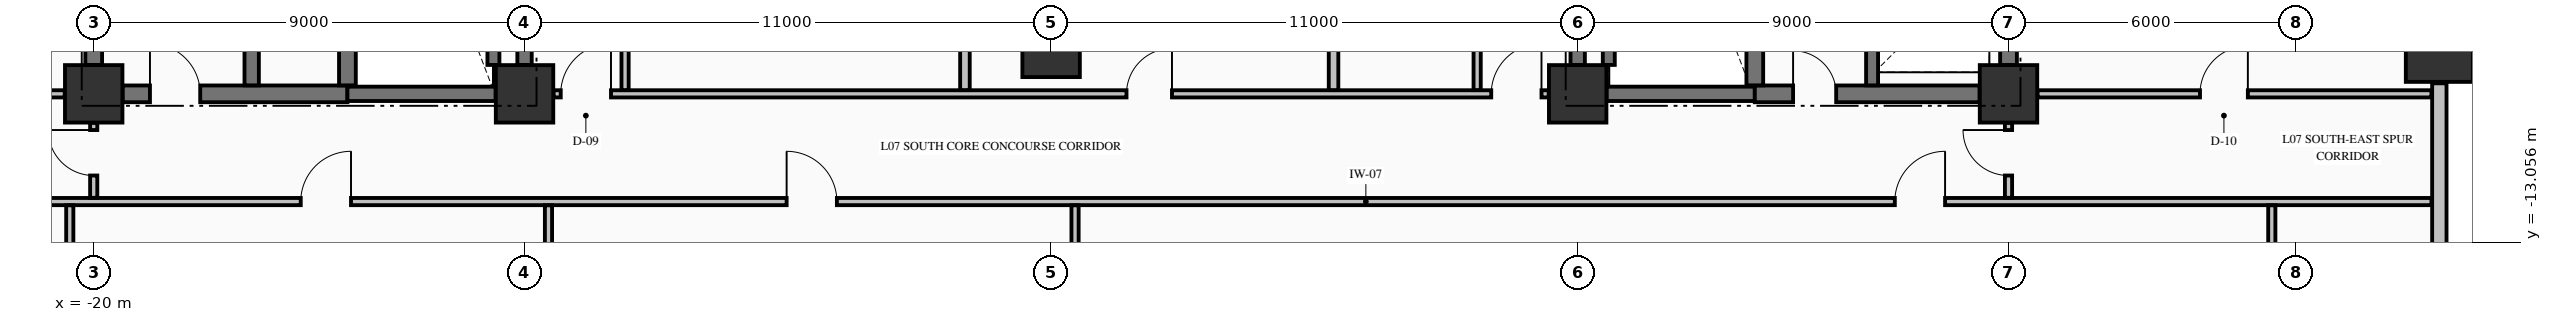
"""IFC4 building model, lengths in metres.
Left out: names, types, materials, properties, quantities, classifications, styles, units other than length and angle.
Written with IfcOpenShell. Run it as: python <this file> out.ifc"""

import sys

from ifc_helpers import new_model, si_unit, direction, frame, frame_2d, origin, origin_2d, place, context, subcontext, project, spatial, rectangle, extrude, element, fill, save


model = new_model("IFC4")
c1 = context("Model", 3, precision=1e-05, world=origin(), true_north=direction((0.0, 1.0)))
c2 = subcontext(c1, "Body", "Model", "MODEL_VIEW")
j1 = project(units=[si_unit("LENGTHUNIT", "METRE"), si_unit("PLANEANGLEUNIT", "RADIAN")], contexts=[c1])
p1 = place(None, origin())
s1 = spatial("IfcSite", under=j1, at=p1, CompositionType="ELEMENT")
p2 = place(p1, origin())
s2 = spatial("IfcBuilding", under=s1, at=p2, CompositionType="ELEMENT")
p3 = place(p2, frame((0.0, 0.0, 34.34)))
s3 = spatial("IfcBuildingStorey", under=s2, at=p3, CompositionType="ELEMENT", Elevation=34.34)
p4 = place(p3, frame((29.0, -9.0, -0.3), z_axis=(0.0, 0.0, 1.0), x_axis=(1.0, 0.0, 0.0)))
e1 = element("IfcColumn", 1, at=p4, inside=s3, PredefinedType="COLUMN", context=c2, shape_type="SweptSolid", body=[
    extrude(rectangle(XDim=1.4, YDim=1.4, at=origin_2d()), origin(), (0.0, 0.0, 1.0), 3.62),
])
for number, where, z_axis, x_axis in (
    (2, (-20.0, -9.95, -0.3), (0.0, 0.0, 1.0), (1.0, 0.0, 0.0)),
    (3, (-11.0, -9.95, -0.3), (0.0, 0.0, 1.0), (1.0, 0.0, 0.0)),
    (4, (11.0, -9.95, -0.3), (0.0, 0.0, 1.0), (1.0, 0.0, 0.0)),
    (5, (20.0, -9.95, -0.3), (0.0, 0.0, 1.0), (1.0, 0.0, 0.0)),
    (6, (0.0, -9.0, -0.3), (0.0, 0.0, 1.0), (1.0, 0.0, 0.0)),
):
    element("IfcColumn", number, at=place(p3, frame(where, z_axis=z_axis, x_axis=x_axis)), inside=s3, PredefinedType="COLUMN", context=c2, shape_type="SweptSolid", body=[
        extrude(rectangle(XDim=1.2, YDim=1.2, at=origin_2d()), origin(), (0.0, 0.0, 1.0), 3.62),
    ])
p5 = place(p3, frame((29.0, -22.27, 0.0), z_axis=(0.0, 0.0, 1.0), x_axis=(0.0, 1.0, 0.0)))
e7 = element("IfcWall", 7, at=p5, inside=s3, PredefinedType="STANDARD", context=c2, shape_type="SweptSolid", body=[
    extrude(rectangle(XDim=12.54, YDim=0.3, at=frame_2d((6.27, 0.0))), origin(), (0.0, 0.0, 1.0), 2.712),
])
p6 = place(p3, frame((-19.396, -9.95, 0.0), z_axis=(0.0, 0.0, 1.0), x_axis=(1.0, 0.0, 0.0)))
e8 = element("IfcWall", 8, at=p6, inside=s3, PredefinedType="SHEAR", context=c2, shape_type="SweptSolid", body=[
    extrude(rectangle(XDim=4.696, YDim=0.35, at=frame_2d((2.348, 0.0))), origin(), (0.0, 0.0, 1.0), 3.32),
])
p7 = place(p6, frame((0.571, 0.0, 0.0)))
e9 = element("IfcOpeningElement", 9, at=p7, cuts=e8, PredefinedType="OPENING", context=c2, shape_type="SweptSolid", body=[
    extrude(rectangle(XDim=1.05, YDim=2.15, at=frame_2d((0.525, 1.075))), frame((0.0, 0.185, 0.0), z_axis=(0.0, -1.0, 0.0), x_axis=(1.0, 0.0, 0.0)), (0.0, 0.0, 1.0), 0.37),
])
for number, where, z_axis, x_axis in (
    (10, (-14.7, -9.95, 0.0), (0.0, 0.0, 1.0), (1.0, 0.0, 0.0)),
    (11, (11.604, -9.95, 0.0), (0.0, 0.0, 1.0), (1.0, 0.0, 0.0)),
):
    element("IfcWall", number, at=place(p3, frame(where, z_axis=z_axis, x_axis=x_axis)), inside=s3, PredefinedType="SHEAR", context=c2, shape_type="SweptSolid", body=[
        extrude(rectangle(XDim=3.096, YDim=0.3, at=frame_2d((1.548, 0.0))), origin(), (0.0, 0.0, 1.0), 3.32),
    ])
p8 = place(p3, frame((14.7, -9.95, 0.0), z_axis=(0.0, 0.0, 1.0), x_axis=(1.0, 0.0, 0.0)))
e12 = element("IfcWall", 12, at=p8, inside=s3, PredefinedType="SHEAR", context=c2, shape_type="SweptSolid", body=[
    extrude(rectangle(XDim=4.696, YDim=0.35, at=frame_2d((2.348, 0.0))), origin(), (0.0, 0.0, 1.0), 3.32),
])
p9 = place(p8, frame((0.8, 0.0, 0.0)))
e13 = element("IfcOpeningElement", 13, at=p9, cuts=e12, PredefinedType="OPENING", context=c2, shape_type="SweptSolid", body=[
    extrude(rectangle(XDim=0.9, YDim=2.15, at=frame_2d((0.45, 1.075))), frame((0.0, 0.185, 0.0), z_axis=(0.0, -1.0, 0.0), x_axis=(1.0, 0.0, 0.0)), (0.0, 0.0, 1.0), 0.37),
])
p10 = place(p3, frame((-23.835, -12.2, 0.0), z_axis=(0.0, 0.0, 1.0), x_axis=(1.0, 0.0, 0.0)))
e14 = element("IfcWall", 14, at=p10, inside=s3, PredefinedType="PARTITIONING", context=c2, shape_type="SweptSolid", body=[
    extrude(rectangle(XDim=52.67, YDim=0.15, at=frame_2d((26.335, 0.0))), origin(), (0.0, 0.0, 1.0), 3.32),
])
p11 = place(p10, frame((8.16, 0.0, 0.0)))
e15 = element("IfcOpeningElement", 15, at=p11, cuts=e14, PredefinedType="OPENING", context=c2, shape_type="SweptSolid", body=[
    extrude(rectangle(XDim=1.05, YDim=2.15, at=frame_2d((0.525, 1.075))), frame((0.0, 0.085, 0.0), z_axis=(0.0, -1.0, 0.0), x_axis=(1.0, 0.0, 0.0)), (0.0, 0.0, 1.0), 0.17),
])
p12 = place(p10, frame((18.31, 0.0, 0.0)))
e16 = element("IfcOpeningElement", 16, at=p12, cuts=e14, PredefinedType="OPENING", context=c2, shape_type="SweptSolid", body=[
    extrude(rectangle(XDim=1.05, YDim=2.15, at=frame_2d((0.525, 1.075))), frame((0.0, 0.085, 0.0), z_axis=(0.0, -1.0, 0.0), x_axis=(1.0, 0.0, 0.0)), (0.0, 0.0, 1.0), 0.17),
])
p13 = place(p10, frame((41.46, 0.0, 0.0)))
e17 = element("IfcOpeningElement", 17, at=p13, cuts=e14, PredefinedType="OPENING", context=c2, shape_type="SweptSolid", body=[
    extrude(rectangle(XDim=1.05, YDim=2.15, at=frame_2d((0.525, 1.075))), frame((0.0, 0.085, 0.0), z_axis=(0.0, -1.0, 0.0), x_axis=(1.0, 0.0, 0.0)), (0.0, 0.0, 1.0), 0.17),
])
p14 = place(p3, frame((-23.835, -9.95, 0.0), z_axis=(0.0, 0.0, 1.0), x_axis=(1.0, 0.0, 0.0)))
e18 = element("IfcWall", 18, at=p14, inside=s3, PredefinedType="PARTITIONING", context=c2, shape_type="SweptSolid", body=[
    extrude(rectangle(XDim=3.229, YDim=0.15, at=frame_2d((1.615, 0.0))), origin(), (0.0, 0.0, 1.0), 3.32),
])
p15 = place(p14, frame((1.36, 0.0, 0.0)))
e19 = element("IfcOpeningElement", 19, at=p15, cuts=e18, PredefinedType="OPENING", context=c2, shape_type="SweptSolid", body=[
    extrude(rectangle(XDim=0.95, YDim=2.15, at=frame_2d((0.475, 1.075))), frame((0.0, 0.085, 0.0), z_axis=(0.0, -1.0, 0.0), x_axis=(1.0, 0.0, 0.0)), (0.0, 0.0, 1.0), 0.17),
])
p16 = place(p3, frame((-10.394, -9.95, 0.0), z_axis=(0.0, 0.0, 1.0), x_axis=(1.0, 0.0, 0.0)))
e20 = element("IfcWall", 20, at=p16, inside=s3, PredefinedType="PARTITIONING", context=c2, shape_type="SweptSolid", body=[
    extrude(rectangle(XDim=20.788, YDim=0.15, at=frame_2d((10.394, 0.0))), origin(), (0.0, 0.0, 1.0), 3.32),
])
p17 = place(p16, frame((0.15, 0.0, 0.0)))
e21 = element("IfcOpeningElement", 21, at=p17, cuts=e20, PredefinedType="OPENING", context=c2, shape_type="SweptSolid", body=[
    extrude(rectangle(XDim=1.05, YDim=2.15, at=frame_2d((0.525, 1.075))), frame((0.0, 0.085, 0.0), z_axis=(0.0, -1.0, 0.0), x_axis=(1.0, 0.0, 0.0)), (0.0, 0.0, 1.0), 0.17),
])
p18 = place(p16, frame((19.588, 0.0, 0.0)))
e22 = element("IfcOpeningElement", 22, at=p18, cuts=e20, PredefinedType="OPENING", context=c2, shape_type="SweptSolid", body=[
    extrude(rectangle(XDim=1.05, YDim=2.15, at=frame_2d((0.525, 1.075))), frame((0.0, 0.085, 0.0), z_axis=(0.0, -1.0, 0.0), x_axis=(1.0, 0.0, 0.0)), (0.0, 0.0, 1.0), 0.17),
])
p19 = place(p16, frame((11.969, 0.0, 0.0)))
e23 = element("IfcOpeningElement", 23, at=p19, cuts=e20, PredefinedType="OPENING", context=c2, shape_type="SweptSolid", body=[
    extrude(rectangle(XDim=0.95, YDim=2.15, at=frame_2d((0.475, 1.075))), frame((0.0, 0.085, 0.0), z_axis=(0.0, -1.0, 0.0), x_axis=(1.0, 0.0, 0.0)), (0.0, 0.0, 1.0), 0.17),
])
p20 = place(p3, frame((20.606, -9.95, 0.0), z_axis=(0.0, 0.0, 1.0), x_axis=(1.0, 0.0, 0.0)))
e24 = element("IfcWall", 24, at=p20, inside=s3, PredefinedType="PARTITIONING", context=c2, shape_type="SweptSolid", body=[
    extrude(rectangle(XDim=8.229, YDim=0.15, at=frame_2d((4.115, 0.0))), origin(), (0.0, 0.0, 1.0), 3.32),
])
p21 = place(p20, frame((3.394, 0.0, 0.0)))
e25 = element("IfcOpeningElement", 25, at=p21, cuts=e24, PredefinedType="OPENING", context=c2, shape_type="SweptSolid", body=[
    extrude(rectangle(XDim=1.0, YDim=2.15, at=frame_2d((0.5, 1.075))), frame((0.0, 0.085, 0.0), z_axis=(0.0, -1.0, 0.0), x_axis=(1.0, 0.0, 0.0)), (0.0, 0.0, 1.0), 0.17),
])
p22 = place(p3, frame((-20.0, -9.346, 0.0), z_axis=(0.0, 0.0, 1.0), x_axis=(0.0, 1.0, 0.0)))
e26 = element("IfcWall", 26, at=p22, inside=s3, PredefinedType="SHEAR", context=c2, shape_type="SweptSolid", body=[
    extrude(rectangle(XDim=8.742, YDim=0.35, at=frame_2d((4.371, 0.0))), origin(), (0.0, 0.0, 1.0), 3.32),
])
p23 = place(p3, frame((-16.7, -9.773, 0.0), z_axis=(0.0, 0.0, 1.0), x_axis=(0.0, 1.0, 0.0)))
e27 = element("IfcWall", 27, at=p23, inside=s3, PredefinedType="SHEAR", context=c2, shape_type="SweptSolid", body=[
    extrude(rectangle(XDim=9.371, YDim=0.3, at=frame_2d((4.686, 0.0))), origin(), (0.0, 0.0, 1.0), 3.32),
])
p24 = place(p3, frame((-14.7, -9.773, 0.0), z_axis=(0.0, 0.0, 1.0), x_axis=(0.0, 1.0, 0.0)))
e28 = element("IfcWall", 28, at=p24, inside=s3, PredefinedType="SHEAR", context=c2, shape_type="SweptSolid", body=[
    extrude(rectangle(XDim=9.371, YDim=0.35, at=frame_2d((4.686, 0.0))), origin(), (0.0, 0.0, 1.0), 3.32),
])
p25 = place(p3, frame((-11.65, -9.346, 0.0), z_axis=(0.0, 0.0, 1.0), x_axis=(0.0, 1.0, 0.0)))
e29 = element("IfcWall", 29, at=p25, inside=s3, PredefinedType="SOLIDWALL", context=c2, shape_type="SweptSolid", body=[
    extrude(rectangle(XDim=8.742, YDim=0.25, at=frame_2d((4.371, 0.0))), origin(), (0.0, 0.0, 1.0), 3.32),
])
for number, where, z_axis, x_axis in (
    (30, (-11.0, -9.346, 0.0), (0.0, 0.0, 1.0), (0.0, 1.0, 0.0)),
    (31, (11.0, -9.346, 0.0), (0.0, 0.0, 1.0), (0.0, 1.0, 0.0)),
):
    element("IfcWall", number, at=place(p3, frame(where, z_axis=z_axis, x_axis=x_axis)), inside=s3, PredefinedType="SHEAR", context=c2, shape_type="SweptSolid", body=[
        extrude(rectangle(XDim=8.742, YDim=0.3, at=frame_2d((4.371, 0.0))), origin(), (0.0, 0.0, 1.0), 3.32),
    ])
p26 = place(p3, frame((11.65, -9.346, 0.0), z_axis=(0.0, 0.0, 1.0), x_axis=(0.0, 1.0, 0.0)))
e32 = element("IfcWall", 32, at=p26, inside=s3, PredefinedType="SOLIDWALL", context=c2, shape_type="SweptSolid", body=[
    extrude(rectangle(XDim=8.742, YDim=0.25, at=frame_2d((4.371, 0.0))), origin(), (0.0, 0.0, 1.0), 3.32),
])
p27 = place(p3, frame((14.7, -9.773, 0.0), z_axis=(0.0, 0.0, 1.0), x_axis=(0.0, 1.0, 0.0)))
e33 = element("IfcWall", 33, at=p27, inside=s3, PredefinedType="SHEAR", context=c2, shape_type="SweptSolid", body=[
    extrude(rectangle(XDim=9.371, YDim=0.35, at=frame_2d((4.686, 0.0))), origin(), (0.0, 0.0, 1.0), 3.32),
])
p28 = place(p3, frame((17.15, -9.773, 0.0), z_axis=(0.0, 0.0, 1.0), x_axis=(0.0, 1.0, 0.0)))
e34 = element("IfcWall", 34, at=p28, inside=s3, PredefinedType="SOLIDWALL", context=c2, shape_type="SweptSolid", body=[
    extrude(rectangle(XDim=2.596, YDim=0.25, at=frame_2d((1.298, 0.0))), origin(), (0.0, 0.0, 1.0), 3.32),
])
p29 = place(p3, frame((20.0, -9.346, 0.0), z_axis=(0.0, 0.0, 1.0), x_axis=(0.0, 1.0, 0.0)))
e35 = element("IfcWall", 35, at=p29, inside=s3, PredefinedType="SHEAR", context=c2, shape_type="SweptSolid", body=[
    extrude(rectangle(XDim=2.169, YDim=0.35, at=frame_2d((1.084, 0.0))), origin(), (0.0, 0.0, 1.0), 3.32),
])
p30 = place(p3, frame((-20.5, -22.294, 0.0), z_axis=(0.0, 0.0, 1.0), x_axis=(0.0, 1.0, 0.0)))
e36 = element("IfcWall", 36, at=p30, inside=s3, PredefinedType="PARTITIONING", context=c2, shape_type="SweptSolid", body=[
    extrude(rectangle(XDim=10.016, YDim=0.15, at=frame_2d((5.008, 0.0))), origin(), (0.0, 0.0, 1.0), 3.32),
])
p31 = place(p3, frame((-20.0, -12.122, 0.0), z_axis=(0.0, 0.0, 1.0), x_axis=(0.0, 1.0, 0.0)))
e37 = element("IfcWall", 37, at=p31, inside=s3, PredefinedType="PARTITIONING", context=c2, shape_type="SweptSolid", body=[
    extrude(rectangle(XDim=1.566, YDim=0.15, at=frame_2d((0.783, 0.0))), origin(), (0.0, 0.0, 1.0), 3.32),
])
p32 = place(p31, frame((0.466, 0.0, 0.0)))
e38 = element("IfcOpeningElement", 38, at=p32, cuts=e37, PredefinedType="OPENING", context=c2, shape_type="SweptSolid", body=[
    extrude(rectangle(XDim=0.95, YDim=2.15, at=frame_2d((0.475, 1.075))), frame((0.0, 0.085, 0.0), z_axis=(0.0, -1.0, 0.0), x_axis=(1.0, 0.0, 0.0)), (0.0, 0.0, 1.0), 0.17),
])
p33 = place(p3, frame((-10.5, -25.794, 0.0), z_axis=(0.0, 0.0, 1.0), x_axis=(0.0, 1.0, 0.0)))
e39 = element("IfcWall", 39, at=p33, inside=s3, PredefinedType="PARTITIONING", context=c2, shape_type="SweptSolid", body=[
    extrude(rectangle(XDim=13.516, YDim=0.15, at=frame_2d((6.758, 0.0))), origin(), (0.0, 0.0, 1.0), 3.32),
])
p34 = place(p3, frame((-8.9, -9.872, 0.0), z_axis=(0.0, 0.0, 1.0), x_axis=(0.0, 1.0, 0.0)))
e40 = element("IfcWall", 40, at=p34, inside=s3, PredefinedType="PARTITIONING", context=c2, shape_type="SweptSolid", body=[
    extrude(rectangle(XDim=6.569, YDim=0.15, at=frame_2d((3.285, 0.0))), origin(), (0.0, 0.0, 1.0), 3.32),
])
p35 = place(p34, frame((2.827, 0.0, 0.0)))
e41 = element("IfcOpeningElement", 41, at=p35, cuts=e40, PredefinedType="OPENING", context=c2, shape_type="SweptSolid", body=[
    extrude(rectangle(XDim=0.95, YDim=2.15, at=frame_2d((0.475, 1.075))), frame((0.0, 0.085, 0.0), z_axis=(0.0, -1.0, 0.0), x_axis=(1.0, 0.0, 0.0)), (0.0, 0.0, 1.0), 0.17),
])
p36 = place(p3, frame((-1.8, -9.872, 0.0), z_axis=(0.0, 0.0, 1.0), x_axis=(0.0, 1.0, 0.0)))
e42 = element("IfcWall", 42, at=p36, inside=s3, PredefinedType="PARTITIONING", context=c2, shape_type="SweptSolid", body=[
    extrude(rectangle(XDim=4.969, YDim=0.2, at=frame_2d((2.484, 0.0))), origin(), (0.0, 0.0, 1.0), 3.32),
])
p37 = place(p3, frame((0.5, -25.794, 0.0), z_axis=(0.0, 0.0, 1.0), x_axis=(0.0, 1.0, 0.0)))
e43 = element("IfcWall", 43, at=p37, inside=s3, PredefinedType="PARTITIONING", context=c2, shape_type="SweptSolid", body=[
    extrude(rectangle(XDim=13.516, YDim=0.15, at=frame_2d((6.758, 0.0))), origin(), (0.0, 0.0, 1.0), 3.32),
])
p38 = place(p3, frame((5.9, -9.872, 0.0), z_axis=(0.0, 0.0, 1.0), x_axis=(0.0, 1.0, 0.0)))
e44 = element("IfcWall", 44, at=p38, inside=s3, PredefinedType="PARTITIONING", context=c2, shape_type="SweptSolid", body=[
    extrude(rectangle(XDim=4.969, YDim=0.2, at=frame_2d((2.484, 0.0))), origin(), (0.0, 0.0, 1.0), 3.32),
])
p39 = place(p3, frame((8.9, -9.872, 0.0), z_axis=(0.0, 0.0, 1.0), x_axis=(0.0, 1.0, 0.0)))
e45 = element("IfcWall", 45, at=p39, inside=s3, PredefinedType="PARTITIONING", context=c2, shape_type="SweptSolid", body=[
    extrude(rectangle(XDim=4.969, YDim=0.15, at=frame_2d((2.484, 0.0))), origin(), (0.0, 0.0, 1.0), 3.32),
])
p40 = place(p39, frame((1.997, 0.0, 0.0)))
e46 = element("IfcOpeningElement", 46, at=p40, cuts=e45, PredefinedType="OPENING", context=c2, shape_type="SweptSolid", body=[
    extrude(rectangle(XDim=0.95, YDim=2.15, at=frame_2d((0.475, 1.075))), frame((0.0, 0.085, 0.0), z_axis=(0.0, -1.0, 0.0), x_axis=(1.0, 0.0, 0.0)), (0.0, 0.0, 1.0), 0.17),
])
p41 = place(p3, frame((20.0, -12.122, 0.0), z_axis=(0.0, 0.0, 1.0), x_axis=(0.0, 1.0, 0.0)))
e47 = element("IfcWall", 47, at=p41, inside=s3, PredefinedType="PARTITIONING", context=c2, shape_type="SweptSolid", body=[
    extrude(rectangle(XDim=1.566, YDim=0.15, at=frame_2d((0.783, 0.0))), origin(), (0.0, 0.0, 1.0), 2.66),
])
p42 = place(p41, frame((0.466, 0.0, 0.0)))
e48 = element("IfcOpeningElement", 48, at=p42, cuts=e47, PredefinedType="OPENING", context=c2, shape_type="SweptSolid", body=[
    extrude(rectangle(XDim=0.95, YDim=2.15, at=frame_2d((0.475, 1.075))), frame((0.0, 0.085, 0.0), z_axis=(0.0, -1.0, 0.0), x_axis=(1.0, 0.0, 0.0)), (0.0, 0.0, 1.0), 0.17),
])
p43 = place(p3, frame((25.5, -22.294, 0.0), z_axis=(0.0, 0.0, 1.0), x_axis=(0.0, 1.0, 0.0)))
e49 = element("IfcWall", 49, at=p43, inside=s3, PredefinedType="PARTITIONING", context=c2, shape_type="SweptSolid", body=[
    extrude(rectangle(XDim=10.016, YDim=0.15, at=frame_2d((5.008, 0.0))), origin(), (0.0, 0.0, 1.0), 3.32),
])
p44 = place(p7, origin())
e50 = element("IfcDoor", 50, at=p44, inside=s3, OperationType="SINGLE_SWING_LEFT", PredefinedType="DOOR", context=c2, shape_type="SweptSolid", body=[
    extrude(rectangle(XDim=1.05, YDim=2.15, at=frame_2d((0.525, 1.075))), frame((0.0, 0.025, 0.0), z_axis=(0.0, -1.0, 0.0), x_axis=(1.0, 0.0, 0.0)), (0.0, 0.0, 1.0), 0.05),
])
fill(e9, e50)
p45 = place(p9, origin())
e51 = element("IfcDoor", 51, at=p45, inside=s3, OperationType="SINGLE_SWING_LEFT", PredefinedType="DOOR", context=c2, shape_type="SweptSolid", body=[
    extrude(rectangle(XDim=0.9, YDim=2.15, at=frame_2d((0.45, 1.075))), frame((0.0, 0.025, 0.0), z_axis=(0.0, -1.0, 0.0), x_axis=(1.0, 0.0, 0.0)), (0.0, 0.0, 1.0), 0.05),
])
fill(e13, e51)
p46 = place(p17, origin())
e52 = element("IfcDoor", 52, at=p46, inside=s3, OperationType="SINGLE_SWING_RIGHT", PredefinedType="DOOR", context=c2, shape_type="SweptSolid", body=[
    extrude(rectangle(XDim=1.05, YDim=2.15, at=frame_2d((0.525, 1.075))), frame((0.0, 0.025, 0.0), z_axis=(0.0, -1.0, 0.0), x_axis=(1.0, 0.0, 0.0)), (0.0, 0.0, 1.0), 0.05),
])
fill(e21, e52)
p47 = place(p18, origin())
e53 = element("IfcDoor", 53, at=p47, inside=s3, OperationType="SINGLE_SWING_RIGHT", PredefinedType="DOOR", context=c2, shape_type="SweptSolid", body=[
    extrude(rectangle(XDim=1.05, YDim=2.15, at=frame_2d((0.525, 1.075))), frame((0.0, 0.025, 0.0), z_axis=(0.0, -1.0, 0.0), x_axis=(1.0, 0.0, 0.0)), (0.0, 0.0, 1.0), 0.05),
])
fill(e22, e53)
p48 = place(p11, origin())
e54 = element("IfcDoor", 54, at=p48, inside=s3, OperationType="SINGLE_SWING_RIGHT", PredefinedType="DOOR", context=c2, shape_type="SweptSolid", body=[
    extrude(rectangle(XDim=1.05, YDim=2.15, at=frame_2d((0.525, 1.075))), frame((0.0, 0.025, 0.0), z_axis=(0.0, -1.0, 0.0), x_axis=(1.0, 0.0, 0.0)), (0.0, 0.0, 1.0), 0.05),
])
fill(e15, e54)
p49 = place(p12, origin())
e55 = element("IfcDoor", 55, at=p49, inside=s3, OperationType="SINGLE_SWING_LEFT", PredefinedType="DOOR", context=c2, shape_type="SweptSolid", body=[
    extrude(rectangle(XDim=1.05, YDim=2.15, at=frame_2d((0.525, 1.075))), frame((0.0, 0.025, 0.0), z_axis=(0.0, -1.0, 0.0), x_axis=(1.0, 0.0, 0.0)), (0.0, 0.0, 1.0), 0.05),
])
fill(e16, e55)
p50 = place(p13, origin())
e56 = element("IfcDoor", 56, at=p50, inside=s3, OperationType="SINGLE_SWING_RIGHT", PredefinedType="DOOR", context=c2, shape_type="SweptSolid", body=[
    extrude(rectangle(XDim=1.05, YDim=2.15, at=frame_2d((0.525, 1.075))), frame((0.0, 0.025, 0.0), z_axis=(0.0, -1.0, 0.0), x_axis=(1.0, 0.0, 0.0)), (0.0, 0.0, 1.0), 0.05),
])
fill(e17, e56)
p51 = place(p19, origin())
e57 = element("IfcDoor", 57, at=p51, inside=s3, OperationType="SINGLE_SWING_RIGHT", PredefinedType="DOOR", context=c2, shape_type="SweptSolid", body=[
    extrude(rectangle(XDim=0.95, YDim=2.15, at=frame_2d((0.475, 1.075))), frame((0.0, 0.025, 0.0), z_axis=(0.0, -1.0, 0.0), x_axis=(1.0, 0.0, 0.0)), (0.0, 0.0, 1.0), 0.05),
])
fill(e23, e57)
p52 = place(p32, origin())
e58 = element("IfcDoor", 58, at=p52, inside=s3, OperationType="SINGLE_SWING_RIGHT", PredefinedType="DOOR", context=c2, shape_type="SweptSolid", body=[
    extrude(rectangle(XDim=0.95, YDim=2.15, at=frame_2d((0.475, 1.075))), frame((0.0, 0.025, 0.0), z_axis=(0.0, -1.0, 0.0), x_axis=(1.0, 0.0, 0.0)), (0.0, 0.0, 1.0), 0.05),
])
fill(e38, e58)
p53 = place(p42, origin())
e59 = element("IfcDoor", 59, at=p53, inside=s3, OperationType="SINGLE_SWING_RIGHT", PredefinedType="DOOR", context=c2, shape_type="SweptSolid", body=[
    extrude(rectangle(XDim=0.95, YDim=2.15, at=frame_2d((0.475, 1.075))), frame((0.0, 0.025, 0.0), z_axis=(0.0, -1.0, 0.0), x_axis=(1.0, 0.0, 0.0)), (0.0, 0.0, 1.0), 0.05),
])
fill(e48, e59)
p54 = place(p21, origin())
e60 = element("IfcDoor", 60, at=p54, inside=s3, OperationType="SINGLE_SWING_RIGHT", PredefinedType="DOOR", context=c2, shape_type="SweptSolid", body=[
    extrude(rectangle(XDim=1.0, YDim=2.15, at=frame_2d((0.5, 1.075))), frame((0.0, 0.025, 0.0), z_axis=(0.0, -1.0, 0.0), x_axis=(1.0, 0.0, 0.0)), (0.0, 0.0, 1.0), 0.05),
])
fill(e25, e60)
save(model, sys.argv[1])
